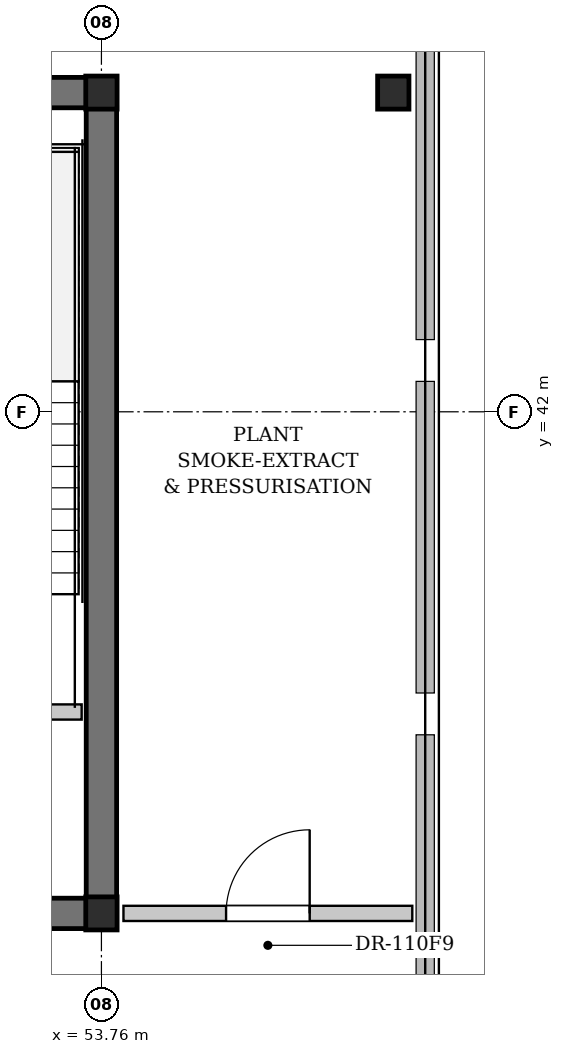
"""IFC4 building model, lengths in metres.
Left out: names, types, materials, properties, quantities, classifications, styles, units other than length and angle.
Written with IfcOpenShell. Run it as: python <this file> out.ifc"""

import sys

from ifc_helpers import new_model, si_unit, direction, frame, frame_2d, origin, origin_2d, place, context, subcontext, project, spatial, rectangle, i_section, extrude, element, fill, save


model = new_model("IFC4")
c1 = context("Model", 3, precision=1e-05, world=origin(), true_north=direction((0.0, 1.0)))
c2 = subcontext(c1, "Body", "Model", "MODEL_VIEW")
j1 = project(units=[si_unit("LENGTHUNIT", "METRE"), si_unit("PLANEANGLEUNIT", "RADIAN")], contexts=[c1])
p1 = place(None, origin())
s1 = spatial("IfcSite", under=j1, at=p1, CompositionType="ELEMENT")
p2 = place(p1, origin())
s2 = spatial("IfcBuilding", under=s1, at=p2, CompositionType="ELEMENT")
p3 = place(p2, frame((0.0, 0.0, 247.4)))
s3 = spatial("IfcBuildingStorey", under=s2, at=p3, CompositionType="ELEMENT", Elevation=247.4)
p4 = place(p3, frame((22.84, 46.2, 0.0), z_axis=(0.0, 0.0, 1.0), x_axis=(1.0, 0.0, 0.0)))
e1 = element("IfcWall", 1, at=p4, inside=s3, PredefinedType="SHEAR", context=c2, shape_type="SweptSolid", body=[
    extrude(rectangle(XDim=31.12, YDim=0.4, at=frame_2d((15.56, 0.0))), origin(), (0.0, 0.0, 1.0), 3.68),
])
p5 = place(p3, frame((52.45, 35.4, 0.0), z_axis=(0.0, 0.0, 1.0), x_axis=(1.0, 0.0, 0.0)))
e2 = element("IfcWall", 2, at=p5, inside=s3, PredefinedType="SHEAR", context=c2, shape_type="SweptSolid", body=[
    extrude(rectangle(XDim=1.51, YDim=0.4, at=frame_2d((0.755, 0.0))), origin(), (0.0, 0.0, 1.0), 3.68),
])
p6 = place(p3, frame((53.76, 35.6, 0.0), z_axis=(0.0, 0.0, 1.0), x_axis=(0.0, 1.0, 0.0)))
e3 = element("IfcWall", 3, at=p6, inside=s3, PredefinedType="SHEAR", context=c2, shape_type="SweptSolid", body=[
    extrude(rectangle(XDim=10.4, YDim=0.4, at=frame_2d((5.2, 0.0))), origin(), (0.0, 0.0, 1.0), 3.68),
])
for number, where, z_axis, x_axis in (
    (4, (53.76, 35.4, 0.0), (0.0, 0.0, 1.0), (1.0, 0.0, 0.0)),
    (5, (53.76, 46.2, 0.0), (0.0, 0.0, 1.0), (1.0, 0.0, 0.0)),
    (6, (57.6, 46.2, 0.0), (0.0, 0.0, 1.0), (1.0, 0.0, 0.0)),
):
    element("IfcColumn", number, at=place(p3, frame(where, z_axis=z_axis, x_axis=x_axis)), inside=s3, PredefinedType="COLUMN", context=c2, shape_type="SweptSolid", body=[
        extrude(i_section(OverallWidth=0.412, OverallDepth=0.435, WebThickness=0.036, FlangeThickness=0.058, FilletRadius=0.015, at=origin_2d()), origin(), (0.0, 0.0, 1.0), 3.9),
    ])
p7 = place(p3, frame((49.78, 38.05, 0.0), z_axis=(0.0, 0.0, 1.0), x_axis=(1.0, 0.0, 0.0)))
e7 = element("IfcWall", 7, at=p7, inside=s3, PredefinedType="PARTITIONING", context=c2, shape_type="SweptSolid", body=[
    extrude(rectangle(XDim=3.72, YDim=0.2, at=frame_2d((1.86, 0.0))), origin(), (0.0, 0.0, 1.0), 3.68),
])
p8 = place(p7, frame((1.436, 0.0, 0.0)))
e8 = element("IfcOpeningElement", 8, at=p8, cuts=e7, PredefinedType="OPENING", context=c2, shape_type="SweptSolid", body=[
    extrude(rectangle(XDim=1.1, YDim=2.15, at=frame_2d((0.55, 1.075))), frame((0.0, 0.11, 0.0), z_axis=(0.0, -1.0, 0.0), x_axis=(1.0, 0.0, 0.0)), (0.0, 0.0, 1.0), 0.22),
])
p9 = place(p3, frame((54.05, 35.4, 0.0), z_axis=(0.0, 0.0, 1.0), x_axis=(1.0, 0.0, 0.0)))
e9 = element("IfcWall", 9, at=p9, inside=s3, PredefinedType="PARTITIONING", context=c2, shape_type="SweptSolid", body=[
    extrude(rectangle(XDim=3.8, YDim=0.2, at=frame_2d((1.9, 0.0))), origin(), (0.0, 0.0, 1.0), 3.68),
])
p10 = place(p9, frame((1.35, 0.0, 0.0)))
e10 = element("IfcOpeningElement", 10, at=p10, cuts=e9, PredefinedType="OPENING", context=c2, shape_type="SweptSolid", body=[
    extrude(rectangle(XDim=1.1, YDim=2.15, at=frame_2d((0.55, 1.075))), frame((0.0, 0.11, 0.0), z_axis=(0.0, -1.0, 0.0), x_axis=(1.0, 0.0, 0.0)), (0.0, 0.0, 1.0), 0.22),
])
p11 = place(p10, origin())
e11 = element("IfcDoor", 11, at=p11, inside=s3, OperationType="SINGLE_SWING_RIGHT", PredefinedType="DOOR", context=c2, shape_type="SweptSolid", body=[
    extrude(rectangle(XDim=1.1, YDim=2.15, at=frame_2d((0.55, 1.075))), frame((0.0, 0.025, 0.0), z_axis=(0.0, -1.0, 0.0), x_axis=(1.0, 0.0, 0.0)), (0.0, 0.0, 1.0), 0.05),
])
fill(e10, e11)
save(model, sys.argv[1])
